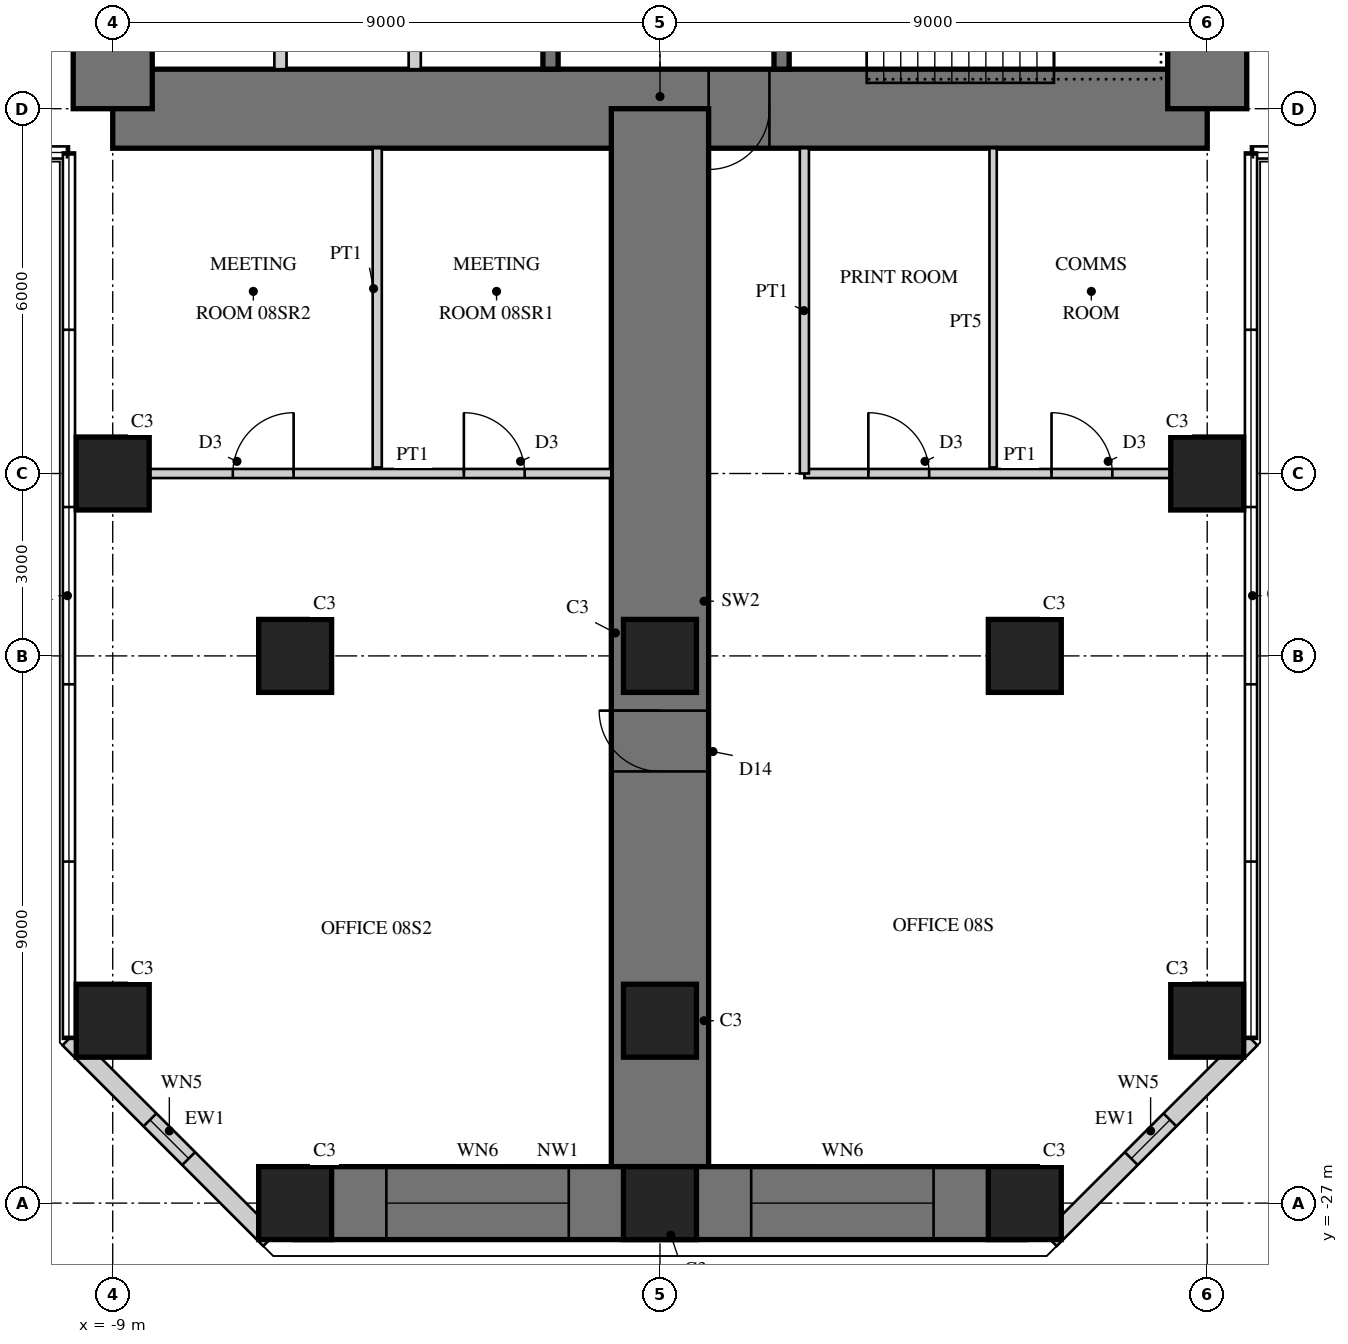
"""IFC4 building model, lengths in metres.
Left out: names, types, materials, properties, quantities, classifications, styles, units other than length and angle.
Written with IfcOpenShell. Run it as: python <this file> out.ifc"""

import sys

from ifc_helpers import new_model, si_unit, direction, frame, frame_2d, origin, origin_2d, place, context, subcontext, project, spatial, rectangle, hollow_rectangle, extrude, element, fill, save


model = new_model("IFC4")
c1 = context("Model", 3, precision=1e-05, world=origin(), true_north=direction((0.0, 1.0)))
c2 = subcontext(c1, "Body", "Model", "MODEL_VIEW")
j1 = project(units=[si_unit("LENGTHUNIT", "METRE"), si_unit("PLANEANGLEUNIT", "RADIAN")], contexts=[c1])
p1 = place(None, origin())
s1 = spatial("IfcSite", under=j1, at=p1, CompositionType="ELEMENT")
p2 = place(p1, origin())
s2 = spatial("IfcBuilding", under=s1, at=p2, CompositionType="ELEMENT")
p3 = place(p2, frame((0.0, 0.0, 35.5)))
s3 = spatial("IfcBuildingStorey", under=s2, at=p3, CompositionType="ELEMENT", Elevation=35.5)
p4 = place(p3, frame((-9.0, -9.0, 0.0), z_axis=(0.0, 0.0, 1.0), x_axis=(1.0, 0.0, 0.0)))
e1 = element("IfcWall", 1, at=p4, inside=s3, PredefinedType="SHEAR", context=c2, shape_type="SweptSolid", body=[
    extrude(rectangle(XDim=18.0, YDim=1.3, at=frame_2d((9.0, 0.0))), origin(), (0.0, 0.0, 1.0), 4.0),
])
p5 = place(p4, frame((9.8, 0.0, 0.0)))
e2 = element("IfcOpeningElement", 2, at=p5, cuts=e1, PredefinedType="OPENING", context=c2, shape_type="SweptSolid", body=[
    extrude(rectangle(XDim=1.0, YDim=2.4, at=frame_2d((0.5, 1.2))), frame((0.0, 0.66, 0.0), z_axis=(0.0, -1.0, 0.0), x_axis=(1.0, 0.0, 0.0)), (0.0, 0.0, 1.0), 1.32),
])
p6 = place(p3, frame((9.0, -9.0, 0.0), z_axis=(0.0, 0.0, 1.0), x_axis=(0.0, 1.0, 0.0)))
e3 = element("IfcWall", 3, at=p6, inside=s3, PredefinedType="SHEAR", context=c2, shape_type="SweptSolid", body=[
    extrude(rectangle(XDim=18.0, YDim=1.3, at=frame_2d((9.0, 0.0))), origin(), (0.0, 0.0, 1.0), 4.0),
])
p7 = place(p6, frame((9.8, 0.0, 0.0)))
e4 = element("IfcOpeningElement", 4, at=p7, cuts=e3, PredefinedType="OPENING", context=c2, shape_type="SweptSolid", body=[
    extrude(rectangle(XDim=1.0, YDim=2.4, at=frame_2d((0.5, 1.2))), frame((0.0, 0.66, 0.0), z_axis=(0.0, -1.0, 0.0), x_axis=(1.0, 0.0, 0.0)), (0.0, 0.0, 1.0), 1.32),
])
p8 = place(p3, frame((-9.0, 9.0, 0.0), z_axis=(0.0, 0.0, 1.0), x_axis=(0.0, -1.0, 0.0)))
e5 = element("IfcWall", 5, at=p8, inside=s3, PredefinedType="SHEAR", context=c2, shape_type="SweptSolid", body=[
    extrude(rectangle(XDim=18.0, YDim=1.3, at=frame_2d((9.0, 0.0))), origin(), (0.0, 0.0, 1.0), 4.0),
])
p9 = place(p8, frame((9.8, 0.0, 0.0)))
e6 = element("IfcOpeningElement", 6, at=p9, cuts=e5, PredefinedType="OPENING", context=c2, shape_type="SweptSolid", body=[
    extrude(rectangle(XDim=1.0, YDim=2.4, at=frame_2d((0.5, 1.2))), frame((0.0, 0.66, 0.0), z_axis=(0.0, -1.0, 0.0), x_axis=(1.0, 0.0, 0.0)), (0.0, 0.0, 1.0), 1.32),
])
p10 = place(p3, frame((-1.8, -1.875, 0.0), z_axis=(0.0, 0.0, 1.0), x_axis=(0.0, -1.0, 0.0)))
e7 = element("IfcWall", 7, at=p10, inside=s3, PredefinedType="SHEAR", context=c2, shape_type="SweptSolid", body=[
    extrude(rectangle(XDim=6.475, YDim=0.25, at=frame_2d((3.238, 0.0))), origin(), (0.0, 0.0, 1.0), 4.0),
])
p11 = place(p10, frame((1.875, 0.0, 0.0)))
e8 = element("IfcOpeningElement", 8, at=p11, cuts=e7, PredefinedType="OPENING", context=c2, shape_type="SweptSolid", body=[
    extrude(rectangle(XDim=1.6, YDim=2.4, at=frame_2d((0.8, 1.2))), frame((0.0, 0.135, 0.0), z_axis=(0.0, -1.0, 0.0), x_axis=(1.0, 0.0, 0.0)), (0.0, 0.0, 1.0), 0.27),
])
for number, where, z_axis, x_axis in (
    (9, (-4.033, -5.975, 0.0), (0.0, 0.0, 1.0), (0.0, -1.0, 0.0)),
    (10, (-6.242, -5.975, 0.0), (0.0, 0.0, 1.0), (0.0, -1.0, 0.0)),
):
    element("IfcWall", number, at=place(p3, frame(where, z_axis=z_axis, x_axis=x_axis)), inside=s3, PredefinedType="PARTITIONING", context=c2, shape_type="SweptSolid", body=[
        extrude(rectangle(XDim=2.375, YDim=0.2, at=frame_2d((1.188, 0.0))), origin(), (0.0, 0.0, 1.0), 4.0),
    ])
p12 = place(p3, frame((2.0, -1.675, 0.0), z_axis=(0.0, 0.0, 1.0), x_axis=(0.0, -1.0, 0.0)))
e11 = element("IfcWall", 11, at=p12, inside=s3, PredefinedType="SHEAR", context=c2, shape_type="SweptSolid", body=[
    extrude(rectangle(XDim=6.675, YDim=0.25, at=frame_2d((3.337, 0.0))), origin(), (0.0, 0.0, 1.0), 4.0),
])
p13 = place(p12, frame((0.725, 0.0, 0.0)))
e12 = element("IfcOpeningElement", 12, at=p13, cuts=e11, PredefinedType="OPENING", context=c2, shape_type="SweptSolid", body=[
    extrude(rectangle(XDim=1.0, YDim=2.1, at=frame_2d((0.5, 1.05))), frame((0.0, 0.135, 0.0), z_axis=(0.0, -1.0, 0.0), x_axis=(1.0, 0.0, 0.0)), (0.0, 0.0, 1.0), 0.27),
])
p14 = place(p3, frame((0.0, -9.0, 0.0), z_axis=(0.0, 0.0, 1.0), x_axis=(0.0, -1.0, 0.0)))
e13 = element("IfcWall", 13, at=p14, inside=s3, PredefinedType="SHEAR", context=c2, shape_type="SweptSolid", body=[
    extrude(rectangle(XDim=18.0, YDim=1.6, at=frame_2d((9.0, 0.0))), origin(), (0.0, 0.0, 1.0), 4.0),
])
p15 = place(p14, frame((9.9, 0.0, 0.0)))
e14 = element("IfcOpeningElement", 14, at=p15, cuts=e13, PredefinedType="OPENING", context=c2, shape_type="SweptSolid", body=[
    extrude(rectangle(XDim=1.0, YDim=2.2, at=frame_2d((0.5, 1.1))), frame((0.0, 0.81, 0.0), z_axis=(0.0, -1.0, 0.0), x_axis=(1.0, 0.0, 0.0)), (0.0, 0.0, 1.0), 1.62),
])
p16 = place(p3, frame((-6.0, -27.0, 0.0), z_axis=(0.0, 0.0, 1.0), x_axis=(1.0, 0.0, 0.0)))
e15 = element("IfcWall", 15, at=p16, inside=s3, PredefinedType="SHEAR", context=c2, shape_type="SweptSolid", body=[
    extrude(rectangle(XDim=12.0, YDim=1.2, at=frame_2d((6.0, 0.0))), origin(), (0.0, 0.0, 1.0), 4.0),
])
p17 = place(p16, frame((1.5, 0.0, 0.6)))
e16 = element("IfcOpeningElement", 16, at=p17, cuts=e15, PredefinedType="OPENING", context=c2, shape_type="SweptSolid", body=[
    extrude(rectangle(XDim=3.0, YDim=2.4, at=frame_2d((1.5, 1.2))), frame((0.0, 0.61, 0.0), z_axis=(0.0, -1.0, 0.0), x_axis=(1.0, 0.0, 0.0)), (0.0, 0.0, 1.0), 1.22),
])
p18 = place(p16, frame((7.5, 0.0, 0.6)))
e17 = element("IfcOpeningElement", 17, at=p18, cuts=e15, PredefinedType="OPENING", context=c2, shape_type="SweptSolid", body=[
    extrude(rectangle(XDim=3.0, YDim=2.4, at=frame_2d((1.5, 1.2))), frame((0.0, 0.61, 0.0), z_axis=(0.0, -1.0, 0.0), x_axis=(1.0, 0.0, 0.0)), (0.0, 0.0, 1.0), 1.22),
])
for number, where, z_axis, x_axis in (
    (18, (-9.0, -15.0, 0.0), (0.0, 0.0, 1.0), (1.0, 0.0, 0.0)),
    (19, (-9.0, -24.0, 0.0), (0.0, 0.0, 1.0), (1.0, 0.0, 0.0)),
    (20, (9.0, -15.0, 0.0), (0.0, 0.0, 1.0), (1.0, 0.0, 0.0)),
    (21, (9.0, -24.0, 0.0), (0.0, 0.0, 1.0), (1.0, 0.0, 0.0)),
    (22, (-6.0, -27.0, 0.0), (0.0, 0.0, 1.0), (1.0, 0.0, 0.0)),
    (23, (0.0, -27.0, 0.0), (0.0, 0.0, 1.0), (1.0, 0.0, 0.0)),
    (24, (6.0, -27.0, 0.0), (0.0, 0.0, 1.0), (1.0, 0.0, 0.0)),
    (25, (-6.0, -18.0, 0.0), (0.0, 0.0, 1.0), (1.0, 0.0, 0.0)),
    (26, (0.0, -18.0, 0.0), (0.0, 0.0, 1.0), (1.0, 0.0, 0.0)),
    (27, (6.0, -18.0, 0.0), (0.0, 0.0, 1.0), (1.0, 0.0, 0.0)),
    (28, (0.0, -24.0, 0.0), (0.0, 0.0, 1.0), (1.0, 0.0, 0.0)),
):
    element("IfcColumn", number, at=place(p3, frame(where, z_axis=z_axis, x_axis=x_axis)), inside=s3, PredefinedType="COLUMN", context=c2, shape_type="SweptSolid", body=[
        extrude(rectangle(XDim=1.2, YDim=1.2, at=origin_2d()), origin(), (0.0, 0.0, 1.0), 4.0),
    ])
p19 = place(p3, frame((-9.72, -24.298, 0.0), z_axis=(0.0, 0.0, 1.0), x_axis=(0.707106781187, -0.707106781187, 0.0)))
e29 = element("IfcWall", 29, at=p19, inside=s3, PredefinedType="SOLIDWALL", context=c2, shape_type="SweptSolid", body=[
    extrude(rectangle(XDim=4.669, YDim=0.3, at=frame_2d((2.335, 0.0))), origin(), (0.0, 0.0, 1.0), 3.8),
])
p20 = place(p19, frame((1.885, 0.0, 0.3)))
e30 = element("IfcOpeningElement", 30, at=p20, cuts=e29, PredefinedType="OPENING", context=c2, shape_type="SweptSolid", body=[
    extrude(rectangle(XDim=0.9, YDim=2.4, at=frame_2d((0.45, 1.2))), frame((0.0, 0.16, 0.0), z_axis=(0.0, -1.0, 0.0), x_axis=(1.0, 0.0, 0.0)), (0.0, 0.0, 1.0), 0.32),
])
p21 = place(p3, frame((6.418, -27.6, 0.0), z_axis=(0.0, 0.0, 1.0), x_axis=(0.707106781187, 0.707106781187, 0.0)))
e31 = element("IfcWall", 31, at=p21, inside=s3, PredefinedType="SOLIDWALL", context=c2, shape_type="SweptSolid", body=[
    extrude(rectangle(XDim=4.669, YDim=0.3, at=frame_2d((2.335, 0.0))), origin(), (0.0, 0.0, 1.0), 3.8),
])
p22 = place(p21, frame((1.885, 0.0, 0.3)))
e32 = element("IfcOpeningElement", 32, at=p22, cuts=e31, PredefinedType="OPENING", context=c2, shape_type="SweptSolid", body=[
    extrude(rectangle(XDim=0.9, YDim=2.4, at=frame_2d((0.45, 1.2))), frame((0.0, 0.16, 0.0), z_axis=(0.0, -1.0, 0.0), x_axis=(1.0, 0.0, 0.0)), (0.0, 0.0, 1.0), 0.32),
])
p23 = place(p3, frame((2.375, -15.0, 0.0), z_axis=(0.0, 0.0, 1.0), x_axis=(1.0, 0.0, 0.0)))
e33 = element("IfcWall", 33, at=p23, inside=s3, PredefinedType="PARTITIONING", context=c2, shape_type="SweptSolid", body=[
    extrude(rectangle(XDim=6.025, YDim=0.15, at=frame_2d((3.012, 0.0))), origin(), (0.0, 0.0, 1.0), 2.95),
])
p24 = place(p23, frame((1.052, 0.0, 0.0)))
e34 = element("IfcOpeningElement", 34, at=p24, cuts=e33, PredefinedType="OPENING", context=c2, shape_type="SweptSolid", body=[
    extrude(rectangle(XDim=1.0, YDim=2.1, at=frame_2d((0.5, 1.05))), frame((0.0, 0.085, 0.0), z_axis=(0.0, -1.0, 0.0), x_axis=(1.0, 0.0, 0.0)), (0.0, 0.0, 1.0), 0.17),
])
p25 = place(p23, frame((4.064, 0.0, 0.0)))
e35 = element("IfcOpeningElement", 35, at=p25, cuts=e33, PredefinedType="OPENING", context=c2, shape_type="SweptSolid", body=[
    extrude(rectangle(XDim=1.0, YDim=2.1, at=frame_2d((0.5, 1.05))), frame((0.0, 0.085, 0.0), z_axis=(0.0, -1.0, 0.0), x_axis=(1.0, 0.0, 0.0)), (0.0, 0.0, 1.0), 0.17),
])
p26 = place(p3, frame((2.375, -9.65, 0.0), z_axis=(0.0, 0.0, 1.0), x_axis=(0.0, -1.0, 0.0)))
e36 = element("IfcWall", 36, at=p26, inside=s3, PredefinedType="PARTITIONING", context=c2, shape_type="SweptSolid", body=[
    extrude(rectangle(XDim=5.35, YDim=0.15, at=frame_2d((2.675, 0.0))), origin(), (0.0, 0.0, 1.0), 3.8),
])
p27 = place(p3, frame((5.479, -9.65, 0.0), z_axis=(0.0, 0.0, 1.0), x_axis=(0.0, -1.0, 0.0)))
e37 = element("IfcWall", 37, at=p27, inside=s3, PredefinedType="PLUMBINGWALL", context=c2, shape_type="SweptSolid", body=[
    extrude(rectangle(XDim=5.25, YDim=0.12, at=frame_2d((2.625, 0.0))), origin(), (0.0, 0.0, 1.0), 3.8),
])
p28 = place(p3, frame((-8.4, -15.0, 0.0), z_axis=(0.0, 0.0, 1.0), x_axis=(1.0, 0.0, 0.0)))
e38 = element("IfcWall", 38, at=p28, inside=s3, PredefinedType="PARTITIONING", context=c2, shape_type="SweptSolid", body=[
    extrude(rectangle(XDim=7.6, YDim=0.15, at=frame_2d((3.8, 0.0))), origin(), (0.0, 0.0, 1.0), 2.95),
])
p29 = place(p28, frame((1.375, 0.0, 0.0)))
e39 = element("IfcOpeningElement", 39, at=p29, cuts=e38, PredefinedType="OPENING", context=c2, shape_type="SweptSolid", body=[
    extrude(rectangle(XDim=1.0, YDim=2.1, at=frame_2d((0.5, 1.05))), frame((0.0, 0.085, 0.0), z_axis=(0.0, -1.0, 0.0), x_axis=(1.0, 0.0, 0.0)), (0.0, 0.0, 1.0), 0.17),
])
p30 = place(p28, frame((5.175, 0.0, 0.0)))
e40 = element("IfcOpeningElement", 40, at=p30, cuts=e38, PredefinedType="OPENING", context=c2, shape_type="SweptSolid", body=[
    extrude(rectangle(XDim=1.0, YDim=2.1, at=frame_2d((0.5, 1.05))), frame((0.0, 0.085, 0.0), z_axis=(0.0, -1.0, 0.0), x_axis=(1.0, 0.0, 0.0)), (0.0, 0.0, 1.0), 0.17),
])
p31 = place(p3, frame((-4.65, -9.65, 0.0), z_axis=(0.0, 0.0, 1.0), x_axis=(0.0, -1.0, 0.0)))
e41 = element("IfcWall", 41, at=p31, inside=s3, PredefinedType="PARTITIONING", context=c2, shape_type="SweptSolid", body=[
    extrude(rectangle(XDim=5.25, YDim=0.15, at=frame_2d((2.625, 0.0))), origin(), (0.0, 0.0, 1.0), 3.8),
])
p32 = place(p20, origin())
e42 = element("IfcWindow", 42, at=p32, inside=s3, PartitioningType="SINGLE_PANEL", PredefinedType="WINDOW", context=c2, shape_type="SweptSolid", body=[
    extrude(hollow_rectangle(XDim=0.9, YDim=2.4, WallThickness=0.06, at=frame_2d((0.45, 1.2))), frame((0.0, 0.03, 0.0), z_axis=(0.0, -1.0, 0.0), x_axis=(1.0, 0.0, 0.0)), (0.0, 0.0, 1.0), 0.06),
    extrude(rectangle(XDim=0.779, YDim=2.279, at=frame_2d((0.45, 1.2))), frame((0.0, 0.03, 0.0), z_axis=(0.0, -1.0, 0.0), x_axis=(1.0, 0.0, 0.0)), (0.0, 0.0, 1.0), 0.06),
])
fill(e30, e42)
p33 = place(p17, origin())
e43 = element("IfcWindow", 43, at=p33, inside=s3, PartitioningType="SINGLE_PANEL", PredefinedType="WINDOW", context=c2, shape_type="SweptSolid", body=[
    extrude(hollow_rectangle(XDim=3.0, YDim=2.4, WallThickness=0.06, at=frame_2d((1.5, 1.2))), frame((0.0, 0.03, 0.0), z_axis=(0.0, -1.0, 0.0), x_axis=(1.0, 0.0, 0.0)), (0.0, 0.0, 1.0), 0.06),
    extrude(rectangle(XDim=2.879, YDim=2.279, at=frame_2d((1.5, 1.2))), frame((0.0, 0.03, 0.0), z_axis=(0.0, -1.0, 0.0), x_axis=(1.0, 0.0, 0.0)), (0.0, 0.0, 1.0), 0.06),
])
fill(e16, e43)
p34 = place(p18, origin())
e44 = element("IfcWindow", 44, at=p34, inside=s3, PartitioningType="SINGLE_PANEL", PredefinedType="WINDOW", context=c2, shape_type="SweptSolid", body=[
    extrude(hollow_rectangle(XDim=3.0, YDim=2.4, WallThickness=0.06, at=frame_2d((1.5, 1.2))), frame((0.0, 0.03, 0.0), z_axis=(0.0, -1.0, 0.0), x_axis=(1.0, 0.0, 0.0)), (0.0, 0.0, 1.0), 0.06),
    extrude(rectangle(XDim=2.879, YDim=2.279, at=frame_2d((1.5, 1.2))), frame((0.0, 0.03, 0.0), z_axis=(0.0, -1.0, 0.0), x_axis=(1.0, 0.0, 0.0)), (0.0, 0.0, 1.0), 0.06),
])
fill(e17, e44)
p35 = place(p22, origin())
e45 = element("IfcWindow", 45, at=p35, inside=s3, PartitioningType="SINGLE_PANEL", PredefinedType="WINDOW", context=c2, shape_type="SweptSolid", body=[
    extrude(hollow_rectangle(XDim=0.9, YDim=2.4, WallThickness=0.06, at=frame_2d((0.45, 1.2))), frame((0.0, 0.03, 0.0), z_axis=(0.0, -1.0, 0.0), x_axis=(1.0, 0.0, 0.0)), (0.0, 0.0, 1.0), 0.06),
    extrude(rectangle(XDim=0.779, YDim=2.279, at=frame_2d((0.45, 1.2))), frame((0.0, 0.03, 0.0), z_axis=(0.0, -1.0, 0.0), x_axis=(1.0, 0.0, 0.0)), (0.0, 0.0, 1.0), 0.06),
])
fill(e32, e45)
p36 = place(p24, origin())
e46 = element("IfcDoor", 46, at=p36, inside=s3, OperationType="SINGLE_SWING_LEFT", PredefinedType="DOOR", context=c2, shape_type="SweptSolid", body=[
    extrude(rectangle(XDim=1.0, YDim=2.1, at=frame_2d((0.5, 1.05))), frame((0.0, 0.025, 0.0), z_axis=(0.0, -1.0, 0.0), x_axis=(1.0, 0.0, 0.0)), (0.0, 0.0, 1.0), 0.05),
])
fill(e34, e46)
p37 = place(p25, origin())
e47 = element("IfcDoor", 47, at=p37, inside=s3, OperationType="SINGLE_SWING_LEFT", PredefinedType="DOOR", context=c2, shape_type="SweptSolid", body=[
    extrude(rectangle(XDim=1.0, YDim=2.1, at=frame_2d((0.5, 1.05))), frame((0.0, 0.025, 0.0), z_axis=(0.0, -1.0, 0.0), x_axis=(1.0, 0.0, 0.0)), (0.0, 0.0, 1.0), 0.05),
])
fill(e35, e47)
p38 = place(p29, origin())
e48 = element("IfcDoor", 48, at=p38, inside=s3, OperationType="SINGLE_SWING_RIGHT", PredefinedType="DOOR", context=c2, shape_type="SweptSolid", body=[
    extrude(rectangle(XDim=1.0, YDim=2.1, at=frame_2d((0.5, 1.05))), frame((0.0, 0.025, 0.0), z_axis=(0.0, -1.0, 0.0), x_axis=(1.0, 0.0, 0.0)), (0.0, 0.0, 1.0), 0.05),
])
fill(e39, e48)
p39 = place(p30, origin())
e49 = element("IfcDoor", 49, at=p39, inside=s3, OperationType="SINGLE_SWING_LEFT", PredefinedType="DOOR", context=c2, shape_type="SweptSolid", body=[
    extrude(rectangle(XDim=1.0, YDim=2.1, at=frame_2d((0.5, 1.05))), frame((0.0, 0.025, 0.0), z_axis=(0.0, -1.0, 0.0), x_axis=(1.0, 0.0, 0.0)), (0.0, 0.0, 1.0), 0.05),
])
fill(e40, e49)
p40 = place(p15, frame((1.0, 0.0, 0.0), z_axis=(0.0, 0.0, 1.0), x_axis=(-1.0, 0.0, 0.0)))
e50 = element("IfcDoor", 50, at=p40, inside=s3, OperationType="SINGLE_SWING_RIGHT", PredefinedType="DOOR", context=c2, shape_type="SweptSolid", body=[
    extrude(rectangle(XDim=1.0, YDim=2.2, at=frame_2d((0.5, 1.1))), frame((0.0, 0.025, 0.0), z_axis=(0.0, -1.0, 0.0), x_axis=(1.0, 0.0, 0.0)), (0.0, 0.0, 1.0), 0.05),
])
fill(e14, e50)
p41 = place(p5, frame((1.0, 0.0, 0.0), z_axis=(0.0, 0.0, 1.0), x_axis=(-1.0, 0.0, 0.0)))
e51 = element("IfcDoor", 51, at=p41, inside=s3, OperationType="SINGLE_SWING_RIGHT", PredefinedType="DOOR", context=c2, shape_type="SweptSolid", body=[
    extrude(rectangle(XDim=1.0, YDim=2.4, at=frame_2d((0.5, 1.2))), frame((0.0, -0.005, 0.0), z_axis=(0.0, -1.0, 0.0), x_axis=(1.0, 0.0, 0.0)), (0.0, 0.0, 1.0), 0.05),
])
fill(e2, e51)
save(model, sys.argv[1])
